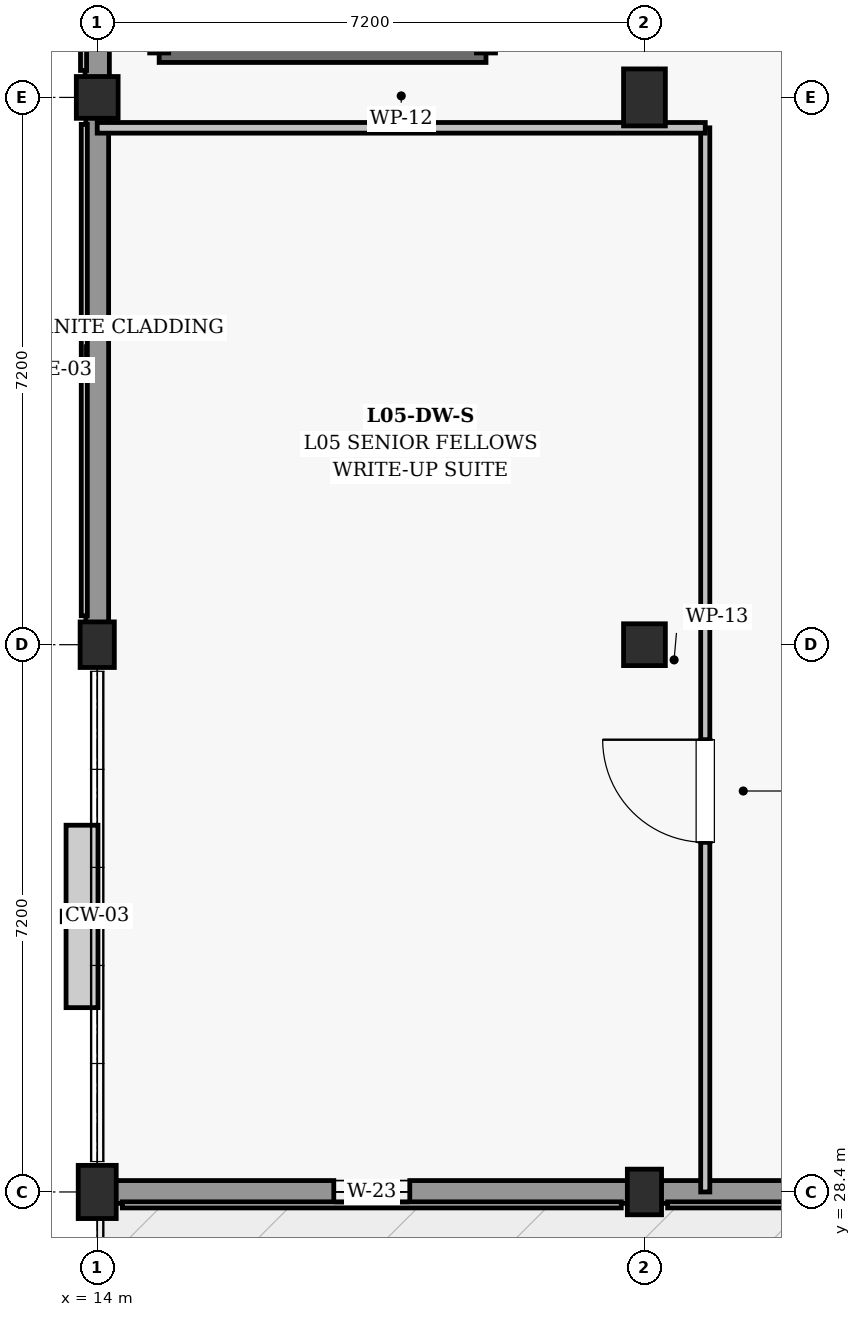
"""IFC4 building model, lengths in metres.
Left out: names, types, materials, properties, quantities, classifications, styles, units other than length and angle.
Written with IfcOpenShell. Run it as: python <this file> out.ifc"""

import sys

from ifc_helpers import new_model, si_unit, direction, frame, frame_2d, origin, origin_2d, place, context, subcontext, project, spatial, rectangle, extrude, element, fill, save


model = new_model("IFC4")
c1 = context("Model", 3, precision=1e-05, world=origin(), true_north=direction((0.0, 1.0)))
c2 = subcontext(c1, "Body", "Model", "MODEL_VIEW")
j1 = project(units=[si_unit("LENGTHUNIT", "METRE"), si_unit("PLANEANGLEUNIT", "RADIAN")], contexts=[c1])
p1 = place(None, origin())
s1 = spatial("IfcSite", under=j1, at=p1, CompositionType="ELEMENT")
p2 = place(p1, origin())
s2 = spatial("IfcBuilding", under=s1, at=p2, CompositionType="ELEMENT")
p3 = place(p2, frame((0.0, 0.0, 23.4)))
s3 = spatial("IfcBuildingStorey", under=s2, at=p3, CompositionType="ELEMENT", Elevation=23.4)
p4 = place(p3, frame((14.0, 28.4, 0.0), z_axis=(0.0, 0.0, 1.0), x_axis=(1.0, 0.0, 0.0)))
e1 = element("IfcColumn", 1, at=p4, inside=s3, PredefinedType="COLUMN", context=c2, shape_type="SweptSolid", body=[
    extrude(rectangle(XDim=0.5, YDim=0.7, at=origin_2d()), origin(), (0.0, 0.0, 1.0), 4.5),
])
p5 = place(p3, frame((14.0, 35.6, 0.0), z_axis=(0.0, 0.0, 1.0), x_axis=(1.0, 0.0, 0.0)))
e2 = element("IfcColumn", 2, at=p5, inside=s3, PredefinedType="COLUMN", context=c2, shape_type="SweptSolid", body=[
    extrude(rectangle(XDim=0.45, YDim=0.6, at=origin_2d()), origin(), (0.0, 0.0, 1.0), 4.5),
])
p6 = place(p3, frame((14.0, 42.8, 0.0), z_axis=(0.0, 0.0, 1.0), x_axis=(1.0, 0.0, 0.0)))
e3 = element("IfcColumn", 3, at=p6, inside=s3, PredefinedType="COLUMN", context=c2, shape_type="SweptSolid", body=[
    extrude(rectangle(XDim=0.55, YDim=0.55, at=origin_2d()), origin(), (0.0, 0.0, 1.0), 4.5),
])
p7 = place(p3, frame((21.2, 28.4, 0.0), z_axis=(0.0, 0.0, 1.0), x_axis=(1.0, 0.0, 0.0)))
e4 = element("IfcColumn", 4, at=p7, inside=s3, PredefinedType="COLUMN", context=c2, shape_type="SweptSolid", body=[
    extrude(rectangle(XDim=0.45, YDim=0.6, at=origin_2d()), origin(), (0.0, 0.0, 1.0), 4.5),
])
p8 = place(p3, frame((21.2, 35.6, 0.0), z_axis=(0.0, 0.0, 1.0), x_axis=(1.0, 0.0, 0.0)))
e5 = element("IfcColumn", 5, at=p8, inside=s3, PredefinedType="COLUMN", context=c2, shape_type="SweptSolid", body=[
    extrude(rectangle(XDim=0.55, YDim=0.55, at=origin_2d()), origin(), (0.0, 0.0, 1.0), 4.5),
])
p9 = place(p3, frame((21.2, 42.8, 0.0), z_axis=(0.0, 0.0, 1.0), x_axis=(1.0, 0.0, 0.0)))
e6 = element("IfcColumn", 6, at=p9, inside=s3, PredefinedType="COLUMN", context=c2, shape_type="SweptSolid", body=[
    extrude(rectangle(XDim=0.55, YDim=0.75, at=origin_2d()), origin(), (0.0, 0.0, 1.0), 4.5),
])
p10 = place(p3, frame((14.0, 35.88, 0.0), z_axis=(0.0, 0.0, 1.0), x_axis=(0.0, 1.0, 0.0)))
e7 = element("IfcWall", 7, at=p10, inside=s3, PredefinedType="SOLIDWALL", context=c2, shape_type="SweptSolid", body=[
    extrude(rectangle(XDim=6.665, YDim=0.3, at=frame_2d((3.333, 0.0))), origin(), (0.0, 0.0, 1.0), 3.375),
])
p11 = place(p3, frame((14.0, 43.055, 0.0), z_axis=(0.0, 0.0, 1.0), x_axis=(0.0, 1.0, 0.0)))
e8 = element("IfcWall", 8, at=p11, inside=s3, PredefinedType="SOLIDWALL", context=c2, shape_type="SweptSolid", body=[
    extrude(rectangle(XDim=6.665, YDim=0.32, at=frame_2d((3.333, 0.0))), origin(), (0.0, 0.0, 1.0), 3.375),
])
p12 = place(p3, frame((14.23, 28.4, 0.0), z_axis=(0.0, 0.0, 1.0), x_axis=(1.0, 0.0, 0.0)))
e9 = element("IfcWall", 9, at=p12, inside=s3, PredefinedType="SOLIDWALL", context=c2, shape_type="SweptSolid", body=[
    extrude(rectangle(XDim=6.765, YDim=0.3, at=frame_2d((3.383, 0.0))), origin(), (0.0, 0.0, 1.0), 3.575),
])
p13 = place(p12, frame((2.883, 0.0, 1.85)))
e10 = element("IfcOpeningElement", 10, at=p13, cuts=e9, PredefinedType="OPENING", context=c2, shape_type="SweptSolid", body=[
    extrude(rectangle(XDim=1.0, YDim=0.95, at=frame_2d((0.5, 0.475))), frame((0.0, 0.16, 0.0), z_axis=(0.0, -1.0, 0.0), x_axis=(1.0, 0.0, 0.0)), (0.0, 0.0, 1.0), 0.32),
])
p14 = place(p3, frame((21.405, 28.4, 0.0), z_axis=(0.0, 0.0, 1.0), x_axis=(1.0, 0.0, 0.0)))
e11 = element("IfcWall", 11, at=p14, inside=s3, PredefinedType="SOLIDWALL", context=c2, shape_type="SweptSolid", body=[
    extrude(rectangle(XDim=6.74, YDim=0.3, at=frame_2d((3.37, 0.0))), origin(), (0.0, 0.0, 1.0), 3.475),
])
p15 = place(p3, frame((14.815, 43.385, 0.0), z_axis=(0.0, 0.0, 1.0), x_axis=(1.0, 0.0, 0.0)))
e12 = element("IfcWall", 12, at=p15, inside=s3, PredefinedType="SHEAR", context=c2, shape_type="SweptSolid", body=[
    extrude(rectangle(XDim=4.3, YDim=0.25, at=frame_2d((2.15, 0.0))), origin(), (0.0, 0.0, 1.0), 4.195),
])
p16 = place(p3, frame((19.115, 43.385, 0.0), z_axis=(0.0, 0.0, 1.0), x_axis=(0.0, 1.0, 0.0)))
e13 = element("IfcWall", 13, at=p16, inside=s3, PredefinedType="SHEAR", context=c2, shape_type="SweptSolid", body=[
    extrude(rectangle(XDim=10.63, YDim=0.25, at=frame_2d((5.315, 0.0))), origin(), (0.0, 0.0, 1.0), 4.195),
])
p17 = place(p16, frame((0.55, 0.0, 0.0)))
e14 = element("IfcOpeningElement", 14, at=p17, cuts=e13, PredefinedType="OPENING", context=c2, shape_type="SweptSolid", body=[
    extrude(rectangle(XDim=1.2, YDim=2.15, at=frame_2d((0.6, 1.075))), frame((0.0, 0.135, 0.0), z_axis=(0.0, -1.0, 0.0), x_axis=(1.0, 0.0, 0.0)), (0.0, 0.0, 1.0), 0.27),
])
p18 = place(p3, frame((14.815, 54.015, 0.0), z_axis=(0.0, 0.0, 1.0), x_axis=(0.0, -1.0, 0.0)))
e15 = element("IfcWall", 15, at=p18, inside=s3, PredefinedType="SHEAR", context=c2, shape_type="SweptSolid", body=[
    extrude(rectangle(XDim=10.63, YDim=0.25, at=frame_2d((5.315, 0.0))), origin(), (0.0, 0.0, 1.0), 4.195),
])
p19 = place(p3, frame((22.0, 28.4, 0.0), z_axis=(0.0, 0.0, 1.0), x_axis=(0.0, 1.0, 0.0)))
e16 = element("IfcWall", 16, at=p19, inside=s3, PredefinedType="PARTITIONING", context=c2, shape_type="SweptSolid", body=[
    extrude(rectangle(XDim=14.0, YDim=0.12, at=frame_2d((7.0, 0.0))), origin(), (0.0, 0.0, 1.0), 3.48),
])
p20 = place(p19, frame((4.6, 0.0, 0.0)))
e17 = element("IfcOpeningElement", 17, at=p20, cuts=e16, PredefinedType="OPENING", context=c2, shape_type="SweptSolid", body=[
    extrude(rectangle(XDim=1.35, YDim=2.2, at=frame_2d((0.675, 1.1))), frame((0.0, 0.07, 0.0), z_axis=(0.0, -1.0, 0.0), x_axis=(1.0, 0.0, 0.0)), (0.0, 0.0, 1.0), 0.14),
])
p21 = place(p3, frame((14.0, 42.4, 0.0), z_axis=(0.0, 0.0, 1.0), x_axis=(1.0, 0.0, 0.0)))
e18 = element("IfcWall", 18, at=p21, inside=s3, PredefinedType="PARTITIONING", context=c2, shape_type="SweptSolid", body=[
    extrude(rectangle(XDim=8.0, YDim=0.14, at=frame_2d((4.0, 0.0))), origin(), (0.0, 0.0, 1.0), 3.58),
])
p22 = place(p13, origin())
e19 = element("IfcWindow", 19, at=p22, inside=s3, PartitioningType="SINGLE_PANEL", PredefinedType="WINDOW", context=c2, shape_type="SweptSolid", body=[
    extrude(rectangle(XDim=1.0, YDim=0.95, at=frame_2d((0.5, 0.475))), frame((0.0, 0.03, 0.0), z_axis=(0.0, -1.0, 0.0), x_axis=(1.0, 0.0, 0.0)), (0.0, 0.0, 1.0), 0.06),
])
fill(e10, e19)
p23 = place(p20, origin())
e20 = element("IfcDoor", 20, at=p23, inside=s3, OperationType="SINGLE_SWING_RIGHT", PredefinedType="DOOR", context=c2, shape_type="SweptSolid", body=[
    extrude(rectangle(XDim=1.35, YDim=2.2, at=frame_2d((0.675, 1.1))), frame((0.0, 0.025, 0.0), z_axis=(0.0, -1.0, 0.0), x_axis=(1.0, 0.0, 0.0)), (0.0, 0.0, 1.0), 0.05),
])
fill(e17, e20)
save(model, sys.argv[1])
